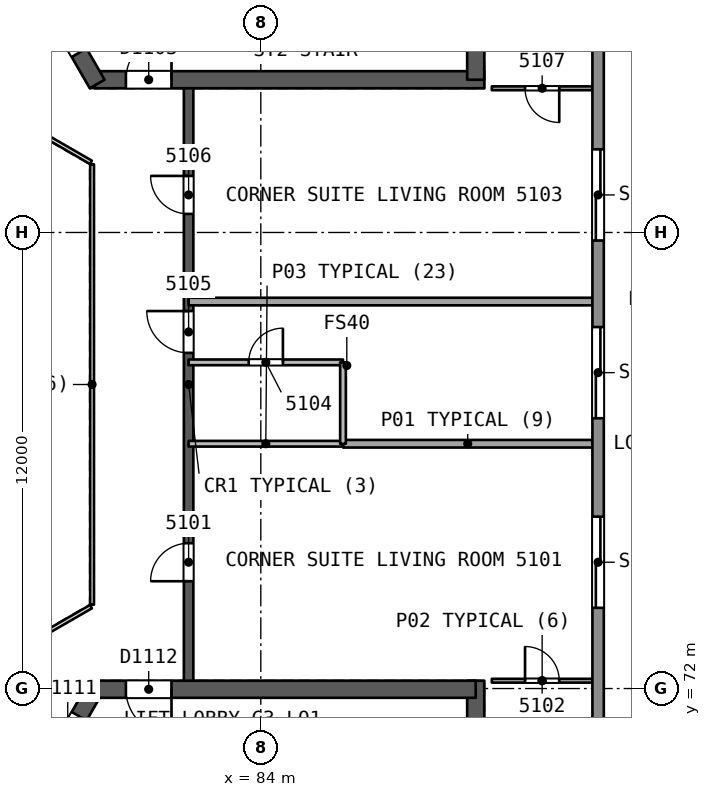
"""IFC4 building model, lengths in metres.
Left out: names, types, materials, properties, quantities, classifications, styles, units other than length and angle.
Written with IfcOpenShell. Run it as: python <this file> out.ifc"""

import sys

from ifc_helpers import new_model, si_unit, direction, frame, frame_2d, origin, place, context, subcontext, project, spatial, rectangle, extrude, element, fill, save


model = new_model("IFC4")
c1 = context("Model", 3, precision=1e-05, world=origin(), true_north=direction((0.0, 1.0)))
c2 = subcontext(c1, "Body", "Model", "MODEL_VIEW")
j1 = project(units=[si_unit("LENGTHUNIT", "METRE"), si_unit("PLANEANGLEUNIT", "RADIAN")], contexts=[c1])
p1 = place(None, origin())
s1 = spatial("IfcSite", under=j1, at=p1, CompositionType="ELEMENT")
p2 = place(p1, origin())
s2 = spatial("IfcBuilding", under=s1, at=p2, CompositionType="ELEMENT")
p3 = place(p2, frame((0.0, 0.0, 209.5)))
s3 = spatial("IfcBuildingStorey", under=s2, at=p3, CompositionType="ELEMENT", Elevation=209.5)
p4 = place(p3, frame((79.63, 88.019, 0.0), z_axis=(0.0, 0.0, 1.0), x_axis=(1.0, 0.0, 0.0)))
e1 = element("IfcWall", 1, at=p4, inside=s3, PredefinedType="SHEAR", context=c2, shape_type="SweptSolid", body=[
    extrude(rectangle(XDim=10.25, YDim=0.45, at=frame_2d((5.125, 0.0))), origin(), (0.0, 0.0, 1.0), 3.7),
])
p5 = place(p4, frame((0.82, 0.0, 0.0)))
e2 = element("IfcOpeningElement", 2, at=p5, cuts=e1, PredefinedType="OPENING", context=c2, shape_type="SweptSolid", body=[
    extrude(rectangle(XDim=1.2, YDim=2.1, at=frame_2d((0.6, 1.05))), frame((0.0, 0.235, 0.0), z_axis=(0.0, -1.0, 0.0), x_axis=(1.0, 0.0, 0.0)), (0.0, 0.0, 1.0), 0.471),
])
p6 = place(p3, frame((89.655, 88.019, 0.0), z_axis=(0.0, 0.0, 1.0), x_axis=(0.0, 1.0, 0.0)))
e3 = element("IfcWall", 3, at=p6, inside=s3, PredefinedType="SHEAR", context=c2, shape_type="SweptSolid", body=[
    extrude(rectangle(XDim=14.108, YDim=0.45, at=frame_2d((7.054, 0.0))), origin(), (0.0, 0.0, 1.0), 3.7),
])
p7 = place(p3, frame((74.617, 96.701, 0.0), z_axis=(0.0, 0.0, 1.0), x_axis=(0.499994385119, -0.866028645513, 0.0)))
e4 = element("IfcWall", 4, at=p7, inside=s3, PredefinedType="SHEAR", context=c2, shape_type="SweptSolid", body=[
    extrude(rectangle(XDim=10.155, YDim=0.45, at=frame_2d((5.077, 0.0))), origin(), (0.0, 0.0, 1.0), 3.7),
])
p8 = place(p7, frame((8.005, 0.0, 0.0)))
e5 = element("IfcOpeningElement", 5, at=p8, cuts=e4, PredefinedType="OPENING", context=c2, shape_type="SweptSolid", body=[
    extrude(rectangle(XDim=1.2, YDim=2.1, at=frame_2d((0.6, 1.05))), frame((0.0, 0.235, 0.0), z_axis=(0.0, -1.0, 0.0), x_axis=(1.0, 0.0, 0.0)), (0.0, 0.0, 1.0), 0.471),
])
p9 = place(p3, frame((79.63, 71.981, 0.0), z_axis=(0.0, 0.0, 1.0), x_axis=(-0.500002171595, -0.86602415001, 0.0)))
e6 = element("IfcWall", 6, at=p9, inside=s3, PredefinedType="SHEAR", context=c2, shape_type="SweptSolid", body=[
    extrude(rectangle(XDim=10.25, YDim=0.45, at=frame_2d((5.125, 0.0))), origin(), (0.0, 0.0, 1.0), 3.7),
])
p10 = place(p9, frame((0.82, 0.0, 0.0)))
e7 = element("IfcOpeningElement", 7, at=p10, cuts=e6, PredefinedType="OPENING", context=c2, shape_type="SweptSolid", body=[
    extrude(rectangle(XDim=1.2, YDim=2.1, at=frame_2d((0.6, 1.05))), frame((0.0, 0.235, 0.0), z_axis=(0.0, -1.0, 0.0), x_axis=(1.0, 0.0, 0.0)), (0.0, 0.0, 1.0), 0.471),
])
p11 = place(p3, frame((89.655, 58.002, 0.0), z_axis=(0.0, 0.0, 1.0), x_axis=(0.0, 1.0, 0.0)))
e8 = element("IfcWall", 8, at=p11, inside=s3, PredefinedType="SHEAR", context=c2, shape_type="SweptSolid", body=[
    extrude(rectangle(XDim=14.204, YDim=0.45, at=frame_2d((7.102, 0.0))), origin(), (0.0, 0.0, 1.0), 3.7),
])
p12 = place(p3, frame((89.655, 71.981, 0.0), z_axis=(0.0, 0.0, 1.0), x_axis=(-1.0, 0.0, 0.0)))
e9 = element("IfcWall", 9, at=p12, inside=s3, PredefinedType="SHEAR", context=c2, shape_type="SweptSolid", body=[
    extrude(rectangle(XDim=10.155, YDim=0.45, at=frame_2d((5.078, 0.0))), origin(), (0.0, 0.0, 1.0), 3.7),
])
p13 = place(p12, frame((8.005, 0.0, 0.0)))
e10 = element("IfcOpeningElement", 10, at=p13, cuts=e9, PredefinedType="OPENING", context=c2, shape_type="SweptSolid", body=[
    extrude(rectangle(XDim=1.2, YDim=2.1, at=frame_2d((0.6, 1.05))), frame((0.0, 0.235, 0.0), z_axis=(0.0, -1.0, 0.0), x_axis=(1.0, 0.0, 0.0)), (0.0, 0.0, 1.0), 0.471),
])
p14 = place(p3, frame((82.1, 72.206, 0.0), z_axis=(0.0, 0.0, 1.0), x_axis=(0.0, 1.0, 0.0)))
e11 = element("IfcWall", 11, at=p14, inside=s3, PredefinedType="SHEAR", context=c2, shape_type="SweptSolid", body=[
    extrude(rectangle(XDim=15.588, YDim=0.25, at=frame_2d((7.794, 0.0))), origin(), (0.0, 0.0, 1.0), 3.3),
])
p15 = place(p14, frame((2.618, 0.0, 0.0)))
e12 = element("IfcOpeningElement", 12, at=p15, cuts=e11, PredefinedType="OPENING", context=c2, shape_type="SweptSolid", body=[
    extrude(rectangle(XDim=1.0, YDim=2.1, at=frame_2d((0.5, 1.05))), frame((0.0, 0.135, 0.0), z_axis=(0.0, -1.0, 0.0), x_axis=(1.0, 0.0, 0.0)), (0.0, 0.0, 1.0), 0.271),
])
p16 = place(p14, frame((8.627, 0.0, 0.0)))
e13 = element("IfcOpeningElement", 13, at=p16, cuts=e11, PredefinedType="OPENING", context=c2, shape_type="SweptSolid", body=[
    extrude(rectangle(XDim=1.1, YDim=2.1, at=frame_2d((0.55, 1.05))), frame((0.0, 0.135, 0.0), z_axis=(0.0, -1.0, 0.0), x_axis=(1.0, 0.0, 0.0)), (0.0, 0.0, 1.0), 0.271),
])
p17 = place(p14, frame((12.282, 0.0, 0.0)))
e14 = element("IfcOpeningElement", 14, at=p17, cuts=e11, PredefinedType="OPENING", context=c2, shape_type="SweptSolid", body=[
    extrude(rectangle(XDim=1.0, YDim=2.1, at=frame_2d((0.5, 1.05))), frame((0.0, 0.135, 0.0), z_axis=(0.0, -1.0, 0.0), x_axis=(1.0, 0.0, 0.0)), (0.0, 0.0, 1.0), 0.271),
])
p18 = place(p3, frame((90.079, 72.206, 0.0), z_axis=(0.0, 0.0, 1.0), x_axis=(1.0, 0.0, 0.0)))
e15 = element("IfcWall", 15, at=p18, inside=s3, PredefinedType="PARTITIONING", context=c2, shape_type="SweptSolid", body=[
    extrude(rectangle(XDim=2.648, YDim=0.1, at=frame_2d((1.324, 0.0))), origin(), (0.0, 0.0, 1.0), 3.3),
])
p19 = place(p18, frame((0.874, 0.0, 0.0)))
e16 = element("IfcOpeningElement", 16, at=p19, cuts=e15, PredefinedType="OPENING", context=c2, shape_type="SweptSolid", body=[
    extrude(rectangle(XDim=0.9, YDim=2.1, at=frame_2d((0.45, 1.05))), frame((0.0, 0.061, 0.0), z_axis=(0.0, -1.0, 0.0), x_axis=(1.0, 0.0, 0.0)), (0.0, 0.0, 1.0), 0.121),
])
p20 = place(p3, frame((92.727, 78.441, 0.0), z_axis=(0.0, 0.0, 1.0), x_axis=(-1.0, 0.0, 0.0)))
e17 = element("IfcWall", 17, at=p20, inside=s3, PredefinedType="PARTITIONING", context=c2, shape_type="SweptSolid", body=[
    extrude(rectangle(XDim=6.564, YDim=0.2, at=frame_2d((3.282, 0.0))), origin(), (0.0, 0.0, 1.0), 3.3),
])
p21 = place(p3, frame((86.163, 78.441, 0.0), z_axis=(0.0, 0.0, 1.0), x_axis=(-1.0, 0.0, 0.0)))
e18 = element("IfcWall", 18, at=p21, inside=s3, PredefinedType="PARTITIONING", context=c2, shape_type="SweptSolid", body=[
    extrude(rectangle(XDim=4.063, YDim=0.15, at=frame_2d((2.031, 0.0))), origin(), (0.0, 0.0, 1.0), 3.3),
])
p22 = place(p3, frame((82.1, 80.582, 0.0), z_axis=(0.0, 0.0, 1.0), x_axis=(1.0, 0.0, 0.0)))
e19 = element("IfcWall", 19, at=p22, inside=s3, PredefinedType="PARTITIONING", context=c2, shape_type="SweptSolid", body=[
    extrude(rectangle(XDim=4.063, YDim=0.15, at=frame_2d((2.031, 0.0))), origin(), (0.0, 0.0, 1.0), 3.3),
])
p23 = place(p22, frame((1.582, 0.0, 0.0)))
e20 = element("IfcOpeningElement", 20, at=p23, cuts=e19, PredefinedType="OPENING", context=c2, shape_type="SweptSolid", body=[
    extrude(rectangle(XDim=0.9, YDim=2.1, at=frame_2d((0.45, 1.05))), frame((0.0, 0.085, 0.0), z_axis=(0.0, -1.0, 0.0), x_axis=(1.0, 0.0, 0.0)), (0.0, 0.0, 1.0), 0.171),
])
p24 = place(p3, frame((86.163, 80.582, 0.0), z_axis=(0.0, 0.0, 1.0), x_axis=(0.0, -1.0, 0.0)))
e21 = element("IfcWall", 21, at=p24, inside=s3, PredefinedType="PARTITIONING", context=c2, shape_type="SweptSolid", body=[
    extrude(rectangle(XDim=2.141, YDim=0.15, at=frame_2d((1.071, 0.0))), origin(), (0.0, 0.0, 1.0), 3.3),
])
p25 = place(p3, frame((92.727, 82.182, 0.0), z_axis=(0.0, 0.0, 1.0), x_axis=(-1.0, 0.0, 0.0)))
e22 = element("IfcWall", 22, at=p25, inside=s3, PredefinedType="PARTITIONING", context=c2, shape_type="SweptSolid", body=[
    extrude(rectangle(XDim=10.627, YDim=0.2, at=frame_2d((5.313, 0.0))), origin(), (0.0, 0.0, 1.0), 3.3),
])
p26 = place(p3, frame((92.727, 87.794, 0.0), z_axis=(0.0, 0.0, 1.0), x_axis=(-1.0, 0.0, 0.0)))
e23 = element("IfcWall", 23, at=p26, inside=s3, PredefinedType="PARTITIONING", context=c2, shape_type="SweptSolid", body=[
    extrude(rectangle(XDim=2.648, YDim=0.1, at=frame_2d((1.324, 0.0))), origin(), (0.0, 0.0, 1.0), 3.3),
])
p27 = place(p26, frame((0.874, 0.0, 0.0)))
e24 = element("IfcOpeningElement", 24, at=p27, cuts=e23, PredefinedType="OPENING", context=c2, shape_type="SweptSolid", body=[
    extrude(rectangle(XDim=0.9, YDim=2.1, at=frame_2d((0.45, 1.05))), frame((0.0, 0.061, 0.0), z_axis=(0.0, -1.0, 0.0), x_axis=(1.0, 0.0, 0.0)), (0.0, 0.0, 1.0), 0.121),
])
p28 = place(p3, frame((92.876, 105.703, 0.0), z_axis=(0.0, 0.0, 1.0), x_axis=(0.0, -1.0, 0.0)))
e25 = element("IfcWall", 25, at=p28, inside=s3, PredefinedType="SOLIDWALL", context=c2, shape_type="SweptSolid", body=[
    extrude(rectangle(XDim=51.406, YDim=0.3, at=frame_2d((25.703, 0.0))), origin(), (0.0, 0.0, 1.0), 3.3),
])
p29 = place(p28, frame((24.191, 0.0, 0.0)))
e26 = element("IfcOpeningElement", 26, at=p29, cuts=e25, PredefinedType="OPENING", context=c2, shape_type="SweptSolid", body=[
    extrude(rectangle(XDim=2.4, YDim=2.4, at=frame_2d((1.2, 1.2))), frame((0.0, 0.161, 0.0), z_axis=(0.0, -1.0, 0.0), x_axis=(1.0, 0.0, 0.0)), (0.0, 0.0, 1.0), 0.321),
])
p30 = place(p28, frame((29.18, 0.0, 0.0)))
e27 = element("IfcOpeningElement", 27, at=p30, cuts=e25, PredefinedType="OPENING", context=c2, shape_type="SweptSolid", body=[
    extrude(rectangle(XDim=2.4, YDim=2.4, at=frame_2d((1.2, 1.2))), frame((0.0, 0.161, 0.0), z_axis=(0.0, -1.0, 0.0), x_axis=(1.0, 0.0, 0.0)), (0.0, 0.0, 1.0), 0.321),
])
p31 = place(p28, frame((39.983, 0.0, 0.0)))
e28 = element("IfcOpeningElement", 28, at=p31, cuts=e25, PredefinedType="OPENING", context=c2, shape_type="SweptSolid", body=[
    extrude(rectangle(XDim=2.4, YDim=2.4, at=frame_2d((1.2, 1.2))), frame((0.0, 0.161, 0.0), z_axis=(0.0, -1.0, 0.0), x_axis=(1.0, 0.0, 0.0)), (0.0, 0.0, 1.0), 0.321),
])
p32 = place(p28, frame((19.515, 0.0, 0.0)))
e29 = element("IfcOpeningElement", 29, at=p32, cuts=e25, PredefinedType="OPENING", context=c2, shape_type="SweptSolid", body=[
    extrude(rectangle(XDim=2.4, YDim=2.4, at=frame_2d((1.2, 1.2))), frame((0.0, 0.161, 0.0), z_axis=(0.0, -1.0, 0.0), x_axis=(1.0, 0.0, 0.0)), (0.0, 0.0, 1.0), 0.321),
])
p33 = place(p28, frame((9.0, 0.0, 0.0)))
e30 = element("IfcOpeningElement", 30, at=p33, cuts=e25, PredefinedType="OPENING", context=c2, shape_type="SweptSolid", body=[
    extrude(rectangle(XDim=2.4, YDim=2.4, at=frame_2d((1.2, 1.2))), frame((0.0, 0.161, 0.0), z_axis=(0.0, -1.0, 0.0), x_axis=(1.0, 0.0, 0.0)), (0.0, 0.0, 1.0), 0.321),
])
p34 = place(p3, frame((43.802, 82.63, 0.0), z_axis=(0.0, 0.0, 1.0), x_axis=(0.866026224187, 0.499998579018, 0.0)))
e31 = element("IfcWall", 31, at=p34, inside=s3, PredefinedType="SOLIDWALL", context=c2, shape_type="SweptSolid", body=[
    extrude(rectangle(XDim=51.406, YDim=0.3, at=frame_2d((25.703, 0.0))), origin(), (0.0, 0.0, 1.0), 3.3),
])
p35 = place(p34, frame((24.503, 0.0, 0.0)))
e32 = element("IfcOpeningElement", 32, at=p35, cuts=e31, PredefinedType="OPENING", context=c2, shape_type="SweptSolid", body=[
    extrude(rectangle(XDim=2.4, YDim=2.4, at=frame_2d((1.2, 1.2))), frame((0.0, 0.161, 0.0), z_axis=(0.0, -1.0, 0.0), x_axis=(1.0, 0.0, 0.0)), (0.0, 0.0, 1.0), 0.321),
])
p36 = place(p34, frame((30.271, 0.0, 0.0)))
e33 = element("IfcOpeningElement", 33, at=p36, cuts=e31, PredefinedType="OPENING", context=c2, shape_type="SweptSolid", body=[
    extrude(rectangle(XDim=2.4, YDim=2.4, at=frame_2d((1.2, 1.2))), frame((0.0, 0.161, 0.0), z_axis=(0.0, -1.0, 0.0), x_axis=(1.0, 0.0, 0.0)), (0.0, 0.0, 1.0), 0.321),
])
p37 = place(p34, frame((39.983, 0.0, 0.0)))
e34 = element("IfcOpeningElement", 34, at=p37, cuts=e31, PredefinedType="OPENING", context=c2, shape_type="SweptSolid", body=[
    extrude(rectangle(XDim=2.4, YDim=2.4, at=frame_2d((1.2, 1.2))), frame((0.0, 0.161, 0.0), z_axis=(0.0, -1.0, 0.0), x_axis=(1.0, 0.0, 0.0)), (0.0, 0.0, 1.0), 0.321),
])
p38 = place(p34, frame((18.736, 0.0, 0.0)))
e35 = element("IfcOpeningElement", 35, at=p38, cuts=e31, PredefinedType="OPENING", context=c2, shape_type="SweptSolid", body=[
    extrude(rectangle(XDim=2.4, YDim=2.4, at=frame_2d((1.2, 1.2))), frame((0.0, 0.161, 0.0), z_axis=(0.0, -1.0, 0.0), x_axis=(1.0, 0.0, 0.0)), (0.0, 0.0, 1.0), 0.321),
])
p39 = place(p34, frame((9.0, 0.0, 0.0)))
e36 = element("IfcOpeningElement", 36, at=p39, cuts=e31, PredefinedType="OPENING", context=c2, shape_type="SweptSolid", body=[
    extrude(rectangle(XDim=2.4, YDim=2.4, at=frame_2d((1.2, 1.2))), frame((0.0, 0.161, 0.0), z_axis=(0.0, -1.0, 0.0), x_axis=(1.0, 0.0, 0.0)), (0.0, 0.0, 1.0), 0.321),
])
p40 = place(p3, frame((88.322, 51.667, 0.0), z_axis=(0.0, 0.0, 1.0), x_axis=(-0.866026224187, 0.499998579018, 0.0)))
e37 = element("IfcWall", 37, at=p40, inside=s3, PredefinedType="SOLIDWALL", context=c2, shape_type="SweptSolid", body=[
    extrude(rectangle(XDim=51.406, YDim=0.3, at=frame_2d((25.703, 0.0))), origin(), (0.0, 0.0, 1.0), 3.3),
])
p41 = place(p40, frame((29.803, 0.0, 0.0)))
e38 = element("IfcOpeningElement", 38, at=p41, cuts=e37, PredefinedType="OPENING", context=c2, shape_type="SweptSolid", body=[
    extrude(rectangle(XDim=2.4, YDim=2.4, at=frame_2d((1.2, 1.2))), frame((0.0, 0.161, 0.0), z_axis=(0.0, -1.0, 0.0), x_axis=(1.0, 0.0, 0.0)), (0.0, 0.0, 1.0), 0.321),
])
p42 = place(p40, frame((39.983, 0.0, 0.0)))
e39 = element("IfcOpeningElement", 39, at=p42, cuts=e37, PredefinedType="OPENING", context=c2, shape_type="SweptSolid", body=[
    extrude(rectangle(XDim=2.4, YDim=2.4, at=frame_2d((1.2, 1.2))), frame((0.0, 0.161, 0.0), z_axis=(0.0, -1.0, 0.0), x_axis=(1.0, 0.0, 0.0)), (0.0, 0.0, 1.0), 0.321),
])
p43 = place(p40, frame((19.827, 0.0, 0.0)))
e40 = element("IfcOpeningElement", 40, at=p43, cuts=e37, PredefinedType="OPENING", context=c2, shape_type="SweptSolid", body=[
    extrude(rectangle(XDim=2.4, YDim=2.4, at=frame_2d((1.2, 1.2))), frame((0.0, 0.161, 0.0), z_axis=(0.0, -1.0, 0.0), x_axis=(1.0, 0.0, 0.0)), (0.0, 0.0, 1.0), 0.321),
])
p44 = place(p40, frame((9.0, 0.0, 0.0)))
e41 = element("IfcOpeningElement", 41, at=p44, cuts=e37, PredefinedType="OPENING", context=c2, shape_type="SweptSolid", body=[
    extrude(rectangle(XDim=2.4, YDim=2.4, at=frame_2d((1.2, 1.2))), frame((0.0, 0.161, 0.0), z_axis=(0.0, -1.0, 0.0), x_axis=(1.0, 0.0, 0.0)), (0.0, 0.0, 1.0), 0.321),
])
p45 = place(p40, frame((25.427, 0.0, 0.9)))
e42 = element("IfcOpeningElement", 42, at=p45, cuts=e37, PredefinedType="OPENING", context=c2, shape_type="SweptSolid", body=[
    extrude(rectangle(XDim=1.8, YDim=1.5, at=frame_2d((0.9, 0.75))), frame((0.0, 0.161, 0.0), z_axis=(0.0, -1.0, 0.0), x_axis=(1.0, 0.0, 0.0)), (0.0, 0.0, 1.0), 0.321),
])
p46 = place(p3, frame((79.56, 74.206, 0.0), z_axis=(0.0, 0.0, 1.0), x_axis=(0.0, 1.0, 0.0)))
e43 = element("IfcWall", 43, at=p46, inside=s3, PredefinedType="PARTITIONING", context=c2, shape_type="SweptSolid", body=[
    extrude(rectangle(XDim=11.588, YDim=0.1, at=frame_2d((5.794, 0.0))), origin(), (0.0, 0.0, 1.0), 3.3),
])
for number, where, z_axis, x_axis in (
    (44, (79.53, 85.846, 0.0), (0.0, 0.0, 1.0), (-0.866, 0.5, 0.0)),
    (45, (77.798, 73.154, 0.0), (0.0, 0.0, 1.0), (0.866, 0.5, 0.0)),
):
    element("IfcWall", number, at=place(p3, frame(where, z_axis=z_axis, x_axis=x_axis)), inside=s3, PredefinedType="PARTITIONING", context=c2, shape_type="SweptSolid", body=[
        extrude(rectangle(XDim=2.0, YDim=0.1, at=frame_2d((1.0, 0.0))), origin(), (0.0, 0.0, 1.0), 3.3),
    ])
p47 = place(p15, origin())
e46 = element("IfcDoor", 46, at=p47, inside=s3, OperationType="SINGLE_SWING_LEFT", PredefinedType="NOTDEFINED", context=c2, shape_type="SweptSolid", body=[
    extrude(rectangle(XDim=1.0, YDim=2.1, at=frame_2d((0.5, 1.05))), frame((0.0, 0.025, 0.0), z_axis=(0.0, -1.0, 0.0), x_axis=(1.0, 0.0, 0.0)), (0.0, 0.0, 1.0), 0.05),
])
fill(e12, e46)
p48 = place(p19, origin())
e47 = element("IfcDoor", 47, at=p48, inside=s3, OperationType="SINGLE_SWING_LEFT", PredefinedType="NOTDEFINED", context=c2, shape_type="SweptSolid", body=[
    extrude(rectangle(XDim=0.9, YDim=2.1, at=frame_2d((0.45, 1.05))), frame((0.0, 0.025, 0.0), z_axis=(0.0, -1.0, 0.0), x_axis=(1.0, 0.0, 0.0)), (0.0, 0.0, 1.0), 0.05),
])
fill(e16, e47)
p49 = place(p23, origin())
e48 = element("IfcDoor", 48, at=p49, inside=s3, OperationType="SINGLE_SWING_RIGHT", PredefinedType="NOTDEFINED", context=c2, shape_type="SweptSolid", body=[
    extrude(rectangle(XDim=0.9, YDim=2.1, at=frame_2d((0.45, 1.05))), frame((0.0, 0.025, 0.0), z_axis=(0.0, -1.0, 0.0), x_axis=(1.0, 0.0, 0.0)), (0.0, 0.0, 1.0), 0.05),
])
fill(e20, e48)
p50 = place(p16, origin())
e49 = element("IfcDoor", 49, at=p50, inside=s3, OperationType="SINGLE_SWING_RIGHT", PredefinedType="NOTDEFINED", context=c2, shape_type="SweptSolid", body=[
    extrude(rectangle(XDim=1.1, YDim=2.1, at=frame_2d((0.55, 1.05))), frame((0.0, 0.025, 0.0), z_axis=(0.0, -1.0, 0.0), x_axis=(1.0, 0.0, 0.0)), (0.0, 0.0, 1.0), 0.05),
])
fill(e13, e49)
p51 = place(p17, origin())
e50 = element("IfcDoor", 50, at=p51, inside=s3, OperationType="SINGLE_SWING_RIGHT", PredefinedType="NOTDEFINED", context=c2, shape_type="SweptSolid", body=[
    extrude(rectangle(XDim=1.0, YDim=2.1, at=frame_2d((0.5, 1.05))), frame((0.0, 0.025, 0.0), z_axis=(0.0, -1.0, 0.0), x_axis=(1.0, 0.0, 0.0)), (0.0, 0.0, 1.0), 0.05),
])
fill(e14, e50)
p52 = place(p27, origin())
e51 = element("IfcDoor", 51, at=p52, inside=s3, OperationType="SINGLE_SWING_LEFT", PredefinedType="NOTDEFINED", context=c2, shape_type="SweptSolid", body=[
    extrude(rectangle(XDim=0.9, YDim=2.1, at=frame_2d((0.45, 1.05))), frame((0.0, 0.025, 0.0), z_axis=(0.0, -1.0, 0.0), x_axis=(1.0, 0.0, 0.0)), (0.0, 0.0, 1.0), 0.05),
])
fill(e24, e51)
p53 = place(p29, origin())
e52 = element("IfcDoor", 52, at=p53, inside=s3, OperationType="SLIDING_TO_LEFT", PredefinedType="NOTDEFINED", context=c2, shape_type="SweptSolid", body=[
    extrude(rectangle(XDim=2.4, YDim=2.4, at=frame_2d((1.2, 1.2))), frame((0.0, 0.025, 0.0), z_axis=(0.0, -1.0, 0.0), x_axis=(1.0, 0.0, 0.0)), (0.0, 0.0, 1.0), 0.05),
])
fill(e26, e52)
p54 = place(p30, origin())
e53 = element("IfcDoor", 53, at=p54, inside=s3, OperationType="SLIDING_TO_RIGHT", PredefinedType="NOTDEFINED", context=c2, shape_type="SweptSolid", body=[
    extrude(rectangle(XDim=2.4, YDim=2.4, at=frame_2d((1.2, 1.2))), frame((0.0, 0.025, 0.0), z_axis=(0.0, -1.0, 0.0), x_axis=(1.0, 0.0, 0.0)), (0.0, 0.0, 1.0), 0.05),
])
fill(e27, e53)
p55 = place(p32, origin())
e54 = element("IfcDoor", 54, at=p55, inside=s3, OperationType="SLIDING_TO_RIGHT", PredefinedType="NOTDEFINED", context=c2, shape_type="SweptSolid", body=[
    extrude(rectangle(XDim=2.4, YDim=2.4, at=frame_2d((1.2, 1.2))), frame((0.0, 0.025, 0.0), z_axis=(0.0, -1.0, 0.0), x_axis=(1.0, 0.0, 0.0)), (0.0, 0.0, 1.0), 0.05),
])
fill(e29, e54)
p56 = place(p5, origin())
e55 = element("IfcDoor", 55, at=p56, inside=s3, OperationType="SINGLE_SWING_RIGHT", PredefinedType="NOTDEFINED", context=c2, shape_type="SweptSolid", body=[
    extrude(rectangle(XDim=1.2, YDim=2.1, at=frame_2d((0.6, 1.05))), frame((0.0, 0.025, 0.0), z_axis=(0.0, -1.0, 0.0), x_axis=(1.0, 0.0, 0.0)), (0.0, 0.0, 1.0), 0.05),
])
fill(e2, e55)
p57 = place(p8, origin())
e56 = element("IfcDoor", 56, at=p57, inside=s3, OperationType="SINGLE_SWING_LEFT", PredefinedType="NOTDEFINED", context=c2, shape_type="SweptSolid", body=[
    extrude(rectangle(XDim=1.2, YDim=2.1, at=frame_2d((0.6, 1.05))), frame((0.0, 0.025, 0.0), z_axis=(0.0, -1.0, 0.0), x_axis=(1.0, 0.0, 0.0)), (0.0, 0.0, 1.0), 0.05),
])
fill(e5, e56)
p58 = place(p10, origin())
e57 = element("IfcDoor", 57, at=p58, inside=s3, OperationType="SINGLE_SWING_RIGHT", PredefinedType="NOTDEFINED", context=c2, shape_type="SweptSolid", body=[
    extrude(rectangle(XDim=1.2, YDim=2.1, at=frame_2d((0.6, 1.05))), frame((0.0, 0.025, 0.0), z_axis=(0.0, -1.0, 0.0), x_axis=(1.0, 0.0, 0.0)), (0.0, 0.0, 1.0), 0.05),
])
fill(e7, e57)
p59 = place(p13, origin())
e58 = element("IfcDoor", 58, at=p59, inside=s3, OperationType="SINGLE_SWING_LEFT", PredefinedType="NOTDEFINED", context=c2, shape_type="SweptSolid", body=[
    extrude(rectangle(XDim=1.2, YDim=2.1, at=frame_2d((0.6, 1.05))), frame((0.0, 0.025, 0.0), z_axis=(0.0, -1.0, 0.0), x_axis=(1.0, 0.0, 0.0)), (0.0, 0.0, 1.0), 0.05),
])
fill(e10, e58)
save(model, sys.argv[1])
